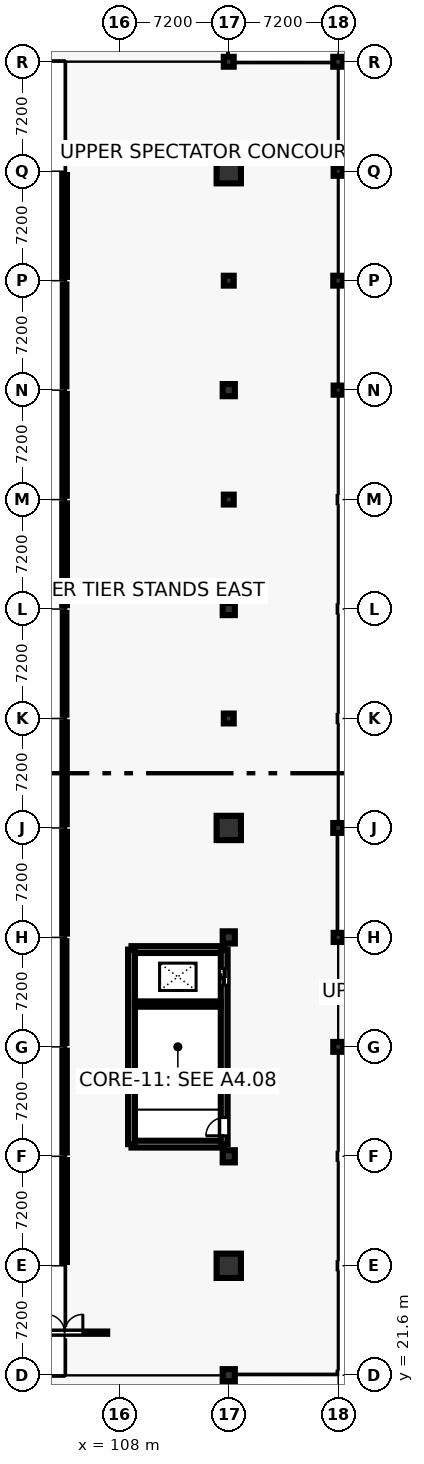
"""IFC4 building model, lengths in metres.
Left out: names, types, materials, properties, quantities, classifications, styles, units other than length and angle.
Written with IfcOpenShell. Run it as: python <this file> out.ifc"""

import sys

from ifc_helpers import new_model, si_unit, direction, frame, frame_2d, origin, origin_2d, place, context, subcontext, project, spatial, rectangle, circle, extrude, element, fill, save


model = new_model("IFC4")
c1 = context("Model", 3, precision=1e-05, world=origin(), true_north=direction((0.0, 1.0)))
c2 = subcontext(c1, "Body", "Model", "MODEL_VIEW")
j1 = project(units=[si_unit("LENGTHUNIT", "METRE"), si_unit("PLANEANGLEUNIT", "RADIAN")], contexts=[c1])
p1 = place(None, origin())
s1 = spatial("IfcSite", under=j1, at=p1, CompositionType="ELEMENT")
p2 = place(p1, origin())
s2 = spatial("IfcBuilding", under=s1, at=p2, CompositionType="ELEMENT")
p3 = place(p2, frame((0.0, 0.0, 13.8)))
s3 = spatial("IfcBuildingStorey", under=s2, at=p3, CompositionType="ELEMENT", Elevation=13.8)
p4 = place(p3, frame((115.2, 21.6, 0.0), z_axis=(0.0, 0.0, 1.0), x_axis=(1.0, 0.0, 0.0)))
e1 = element("IfcColumn", 1, at=p4, inside=s3, PredefinedType="COLUMN", context=c2, shape_type="SweptSolid", body=[
    extrude(circle(Radius=0.4, at=origin_2d()), origin(), (0.0, 0.0, 1.0), 4.8),
])
p5 = place(p3, frame((115.2, 28.8, 0.0), z_axis=(0.0, 0.0, 1.0), x_axis=(1.0, 0.0, 0.0)))
e2 = element("IfcColumn", 2, at=p5, inside=s3, PredefinedType="COLUMN", context=c2, shape_type="SweptSolid", body=[
    extrude(circle(Radius=0.8, at=origin_2d()), origin(), (0.0, 0.0, 1.0), 4.8),
])
for number, where, z_axis, x_axis in (
    (3, (115.2, 36.0, 0.0), (0.0, 0.0, 1.0), (1.0, 0.0, 0.0)),
    (4, (115.2, 50.4, 0.0), (0.0, 0.0, 1.0), (1.0, 0.0, 0.0)),
):
    element("IfcColumn", number, at=place(p3, frame(where, z_axis=z_axis, x_axis=x_axis)), inside=s3, PredefinedType="COLUMN", context=c2, shape_type="SweptSolid", body=[
        extrude(circle(Radius=0.4, at=origin_2d()), origin(), (0.0, 0.0, 1.0), 4.8),
    ])
p6 = place(p3, frame((115.2, 57.6, 0.0), z_axis=(0.0, 0.0, 1.0), x_axis=(1.0, 0.0, 0.0)))
e5 = element("IfcColumn", 5, at=p6, inside=s3, PredefinedType="COLUMN", context=c2, shape_type="SweptSolid", body=[
    extrude(circle(Radius=0.8, at=origin_2d()), origin(), (0.0, 0.0, 1.0), 4.8),
])
p7 = place(p3, frame((115.2, 64.8, 0.0), z_axis=(0.0, 0.0, 1.0), x_axis=(1.0, 0.0, 0.0)))
e6 = element("IfcColumn", 6, at=p7, inside=s3, PredefinedType="COLUMN", context=c2, shape_type="SweptSolid", body=[
    extrude(rectangle(XDim=0.65, YDim=0.65, at=origin_2d()), origin(), (0.0, 0.0, 1.0), 4.8),
])
p8 = place(p3, frame((115.2, 72.0, 0.0), z_axis=(0.0, 0.0, 1.0), x_axis=(1.0, 0.0, 0.0)))
e7 = element("IfcColumn", 7, at=p8, inside=s3, PredefinedType="COLUMN", context=c2, shape_type="SweptSolid", body=[
    extrude(circle(Radius=0.4, at=origin_2d()), origin(), (0.0, 0.0, 1.0), 4.8),
])
p9 = place(p3, frame((115.2, 79.2, 0.0), z_axis=(0.0, 0.0, 1.0), x_axis=(1.0, 0.0, 0.0)))
e8 = element("IfcColumn", 8, at=p9, inside=s3, PredefinedType="COLUMN", context=c2, shape_type="SweptSolid", body=[
    extrude(rectangle(XDim=0.65, YDim=0.65, at=origin_2d()), origin(), (0.0, 0.0, 1.0), 4.8),
])
p10 = place(p3, frame((115.2, 86.4, 0.0), z_axis=(0.0, 0.0, 1.0), x_axis=(1.0, 0.0, 0.0)))
e9 = element("IfcColumn", 9, at=p10, inside=s3, PredefinedType="COLUMN", context=c2, shape_type="SweptSolid", body=[
    extrude(circle(Radius=0.4, at=origin_2d()), origin(), (0.0, 0.0, 1.0), 4.8),
])
p11 = place(p3, frame((115.2, 93.6, 0.0), z_axis=(0.0, 0.0, 1.0), x_axis=(1.0, 0.0, 0.0)))
e10 = element("IfcColumn", 10, at=p11, inside=s3, PredefinedType="COLUMN", context=c2, shape_type="SweptSolid", body=[
    extrude(rectangle(XDim=0.65, YDim=0.65, at=origin_2d()), origin(), (0.0, 0.0, 1.0), 4.8),
])
p12 = place(p3, frame((115.2, 100.8, 0.0), z_axis=(0.0, 0.0, 1.0), x_axis=(1.0, 0.0, 0.0)))
e11 = element("IfcColumn", 11, at=p12, inside=s3, PredefinedType="COLUMN", context=c2, shape_type="SweptSolid", body=[
    extrude(circle(Radius=0.8, at=origin_2d()), origin(), (0.0, 0.0, 1.0), 4.8),
])
for number, where, z_axis, x_axis in (
    (12, (115.2, 108.0, 0.0), (0.0, 0.0, 1.0), (1.0, 0.0, 0.0)),
    (13, (122.4, 43.2, 0.0), (0.0, 0.0, 1.0), (1.0, 0.0, 0.0)),
):
    element("IfcColumn", number, at=place(p3, frame(where, z_axis=z_axis, x_axis=x_axis)), inside=s3, PredefinedType="COLUMN", context=c2, shape_type="SweptSolid", body=[
        extrude(rectangle(XDim=0.65, YDim=0.65, at=origin_2d()), origin(), (0.0, 0.0, 1.0), 4.8),
    ])
p13 = place(p3, frame((122.4, 50.4, 0.0), z_axis=(0.0, 0.0, 1.0), x_axis=(1.0, 0.0, 0.0)))
e14 = element("IfcColumn", 14, at=p13, inside=s3, PredefinedType="COLUMN", context=c2, shape_type="SweptSolid", body=[
    extrude(rectangle(XDim=0.6, YDim=0.6, at=origin_2d()), origin(), (0.0, 0.0, 1.0), 4.8),
])
p14 = place(p3, frame((122.4, 57.6, 0.0), z_axis=(0.0, 0.0, 1.0), x_axis=(1.0, 0.0, 0.0)))
e15 = element("IfcColumn", 15, at=p14, inside=s3, PredefinedType="COLUMN", context=c2, shape_type="SweptSolid", body=[
    extrude(rectangle(XDim=0.65, YDim=0.65, at=origin_2d()), origin(), (0.0, 0.0, 1.0), 4.8),
])
p15 = place(p3, frame((122.4, 86.4, 0.0), z_axis=(0.0, 0.0, 1.0), x_axis=(1.0, 0.0, 0.0)))
e16 = element("IfcColumn", 16, at=p15, inside=s3, PredefinedType="COLUMN", context=c2, shape_type="SweptSolid", body=[
    extrude(rectangle(XDim=0.6, YDim=0.6, at=origin_2d()), origin(), (0.0, 0.0, 1.0), 4.8),
])
p16 = place(p3, frame((122.4, 93.6, 0.0), z_axis=(0.0, 0.0, 1.0), x_axis=(1.0, 0.0, 0.0)))
e17 = element("IfcColumn", 17, at=p16, inside=s3, PredefinedType="COLUMN", context=c2, shape_type="SweptSolid", body=[
    extrude(rectangle(XDim=0.65, YDim=0.65, at=origin_2d()), origin(), (0.0, 0.0, 1.0), 4.8),
])
p17 = place(p3, frame((122.4, 100.8, 0.0), z_axis=(0.0, 0.0, 1.0), x_axis=(1.0, 0.0, 0.0)))
e18 = element("IfcColumn", 18, at=p17, inside=s3, PredefinedType="COLUMN", context=c2, shape_type="SweptSolid", body=[
    extrude(rectangle(XDim=0.6, YDim=0.6, at=origin_2d()), origin(), (0.0, 0.0, 1.0), 4.8),
])
p18 = place(p3, frame((122.4, 108.0, 0.0), z_axis=(0.0, 0.0, 1.0), x_axis=(1.0, 0.0, 0.0)))
e19 = element("IfcColumn", 19, at=p18, inside=s3, PredefinedType="COLUMN", context=c2, shape_type="SweptSolid", body=[
    extrude(rectangle(XDim=0.65, YDim=0.65, at=origin_2d()), origin(), (0.0, 0.0, 1.0), 4.8),
])
for number, where, z_axis, x_axis in (
    (20, (108.8, 36.8, 0.0), (0.0, 0.0, 1.0), (1.0, 0.0, 0.0)),
    (21, (108.8, 49.6, 0.0), (0.0, 0.0, 1.0), (1.0, 0.0, 0.0)),
):
    element("IfcWall", number, at=place(p3, frame(where, z_axis=z_axis, x_axis=x_axis)), inside=s3, PredefinedType="SHEAR", context=c2, shape_type="SweptSolid", body=[
        extrude(rectangle(XDim=6.1, YDim=0.45, at=frame_2d((3.05, 0.0))), origin(), (0.0, 0.0, 1.0), 4.53),
    ])
p19 = place(p3, frame((108.8, 36.8, 0.0), z_axis=(0.0, 0.0, 1.0), x_axis=(0.0, 1.0, 0.0)))
e22 = element("IfcWall", 22, at=p19, inside=s3, PredefinedType="SHEAR", context=c2, shape_type="SweptSolid", body=[
    extrude(rectangle(XDim=12.8, YDim=0.45, at=frame_2d((6.4, 0.0))), origin(), (0.0, 0.0, 1.0), 4.53),
])
p20 = place(p3, frame((114.9, 36.8, 0.0), z_axis=(0.0, 0.0, 1.0), x_axis=(0.0, 1.0, 0.0)))
e23 = element("IfcWall", 23, at=p20, inside=s3, PredefinedType="SHEAR", context=c2, shape_type="SweptSolid", body=[
    extrude(rectangle(XDim=12.8, YDim=0.45, at=frame_2d((6.4, 0.0))), origin(), (0.0, 0.0, 1.0), 4.53),
])
p21 = place(p20, frame((0.55, 0.0, 0.0)))
e24 = element("IfcOpeningElement", 24, at=p21, cuts=e23, PredefinedType="OPENING", context=c2, shape_type="SweptSolid", body=[
    extrude(rectangle(XDim=1.2, YDim=2.25, at=frame_2d((0.6, 1.125))), frame((0.0, 0.235, 0.0), z_axis=(0.0, -1.0, 0.0), x_axis=(1.0, 0.0, 0.0)), (0.0, 0.0, 1.0), 0.47),
])
p22 = place(p20, frame((10.458, 0.0, 0.0)))
e25 = element("IfcOpeningElement", 25, at=p22, cuts=e23, PredefinedType="OPENING", context=c2, shape_type="SweptSolid", body=[
    extrude(rectangle(XDim=1.1, YDim=2.2, at=frame_2d((0.55, 1.1))), frame((0.0, 0.235, 0.0), z_axis=(0.0, -1.0, 0.0), x_axis=(1.0, 0.0, 0.0)), (0.0, 0.0, 1.0), 0.47),
])
p23 = place(p3, frame((109.025, 46.016, 0.0), z_axis=(0.0, 0.0, 1.0), x_axis=(1.0, 0.0, 0.0)))
e26 = element("IfcWall", 26, at=p23, inside=s3, PredefinedType="SHEAR", context=c2, shape_type="SweptSolid", body=[
    extrude(rectangle(XDim=5.65, YDim=0.35, at=frame_2d((2.825, 0.0))), origin(), (0.0, 0.0, 1.0), 4.53),
])
p24 = place(p3, frame((104.4, 29.05, 0.0), z_axis=(0.0, 0.0, 1.0), x_axis=(0.0, 1.0, 0.0)))
e27 = element("IfcWall", 27, at=p24, inside=s3, PredefinedType="SOLIDWALL", context=c2, shape_type="SweptSolid", body=[
    extrude(rectangle(XDim=6.7, YDim=0.31, at=frame_2d((3.35, 0.0))), origin(), (0.0, 0.0, 1.0), 3.59),
])
p25 = place(p24, frame((2.4, 0.0, 0.9)))
e28 = element("IfcOpeningElement", 28, at=p25, cuts=e27, PredefinedType="OPENING", context=c2, shape_type="SweptSolid", body=[
    extrude(rectangle(XDim=1.9, YDim=1.3, at=frame_2d((0.95, 0.65))), frame((0.0, 0.165, 0.0), z_axis=(0.0, -1.0, 0.0), x_axis=(1.0, 0.0, 0.0)), (0.0, 0.0, 1.0), 0.33),
])
p26 = place(p3, frame((104.4, 36.25, 0.0), z_axis=(0.0, 0.0, 1.0), x_axis=(0.0, 1.0, 0.0)))
e29 = element("IfcWall", 29, at=p26, inside=s3, PredefinedType="SOLIDWALL", context=c2, shape_type="SweptSolid", body=[
    extrude(rectangle(XDim=6.7, YDim=0.29, at=frame_2d((3.35, 0.0))), origin(), (0.0, 0.0, 1.0), 3.59),
])
p27 = place(p26, frame((2.7, 0.0, 0.9)))
e30 = element("IfcOpeningElement", 30, at=p27, cuts=e29, PredefinedType="OPENING", context=c2, shape_type="SweptSolid", body=[
    extrude(rectangle(XDim=1.3, YDim=1.3, at=frame_2d((0.65, 0.65))), frame((0.0, 0.155, 0.0), z_axis=(0.0, -1.0, 0.0), x_axis=(1.0, 0.0, 0.0)), (0.0, 0.0, 1.0), 0.31),
])
p28 = place(p3, frame((104.4, 43.45, 0.0), z_axis=(0.0, 0.0, 1.0), x_axis=(0.0, 1.0, 0.0)))
e31 = element("IfcWall", 31, at=p28, inside=s3, PredefinedType="SOLIDWALL", context=c2, shape_type="SweptSolid", body=[
    extrude(rectangle(XDim=6.7, YDim=0.24, at=frame_2d((3.35, 0.0))), origin(), (0.0, 0.0, 1.0), 3.59),
])
p29 = place(p28, frame((2.15, 0.0, 0.9)))
e32 = element("IfcOpeningElement", 32, at=p29, cuts=e31, PredefinedType="OPENING", context=c2, shape_type="SweptSolid", body=[
    extrude(rectangle(XDim=2.4, YDim=1.8, at=frame_2d((1.2, 0.9))), frame((0.0, 0.13, 0.0), z_axis=(0.0, -1.0, 0.0), x_axis=(1.0, 0.0, 0.0)), (0.0, 0.0, 1.0), 0.26),
])
p30 = place(p3, frame((104.4, 50.65, 0.0), z_axis=(0.0, 0.0, 1.0), x_axis=(0.0, 1.0, 0.0)))
e33 = element("IfcWall", 33, at=p30, inside=s3, PredefinedType="SOLIDWALL", context=c2, shape_type="SweptSolid", body=[
    extrude(rectangle(XDim=6.7, YDim=0.31, at=frame_2d((3.35, 0.0))), origin(), (0.0, 0.0, 1.0), 3.59),
])
p31 = place(p30, frame((2.3, 0.0, 0.9)))
e34 = element("IfcOpeningElement", 34, at=p31, cuts=e33, PredefinedType="OPENING", context=c2, shape_type="SweptSolid", body=[
    extrude(rectangle(XDim=2.1, YDim=1.8, at=frame_2d((1.05, 0.9))), frame((0.0, 0.165, 0.0), z_axis=(0.0, -1.0, 0.0), x_axis=(1.0, 0.0, 0.0)), (0.0, 0.0, 1.0), 0.33),
])
p32 = place(p3, frame((104.4, 57.85, 0.0), z_axis=(0.0, 0.0, 1.0), x_axis=(0.0, 1.0, 0.0)))
e35 = element("IfcWall", 35, at=p32, inside=s3, PredefinedType="SOLIDWALL", context=c2, shape_type="SweptSolid", body=[
    extrude(rectangle(XDim=6.7, YDim=0.29, at=frame_2d((3.35, 0.0))), origin(), (0.0, 0.0, 1.0), 3.59),
])
p33 = place(p32, frame((2.45, 0.0, 0.9)))
e36 = element("IfcOpeningElement", 36, at=p33, cuts=e35, PredefinedType="OPENING", context=c2, shape_type="SweptSolid", body=[
    extrude(rectangle(XDim=1.8, YDim=1.8, at=frame_2d((0.9, 0.9))), frame((0.0, 0.155, 0.0), z_axis=(0.0, -1.0, 0.0), x_axis=(1.0, 0.0, 0.0)), (0.0, 0.0, 1.0), 0.31),
])
p34 = place(p3, frame((104.4, 65.05, 0.0), z_axis=(0.0, 0.0, 1.0), x_axis=(0.0, 1.0, 0.0)))
e37 = element("IfcWall", 37, at=p34, inside=s3, PredefinedType="SOLIDWALL", context=c2, shape_type="SweptSolid", body=[
    extrude(rectangle(XDim=6.7, YDim=0.24, at=frame_2d((3.35, 0.0))), origin(), (0.0, 0.0, 1.0), 3.59),
])
p35 = place(p34, frame((2.45, 0.0, 0.9)))
e38 = element("IfcOpeningElement", 38, at=p35, cuts=e37, PredefinedType="OPENING", context=c2, shape_type="SweptSolid", body=[
    extrude(rectangle(XDim=1.8, YDim=1.5, at=frame_2d((0.9, 0.75))), frame((0.0, 0.13, 0.0), z_axis=(0.0, -1.0, 0.0), x_axis=(1.0, 0.0, 0.0)), (0.0, 0.0, 1.0), 0.26),
])
p36 = place(p3, frame((104.4, 72.25, 0.0), z_axis=(0.0, 0.0, 1.0), x_axis=(0.0, 1.0, 0.0)))
e39 = element("IfcWall", 39, at=p36, inside=s3, PredefinedType="SOLIDWALL", context=c2, shape_type="SweptSolid", body=[
    extrude(rectangle(XDim=6.7, YDim=0.31, at=frame_2d((3.35, 0.0))), origin(), (0.0, 0.0, 1.0), 3.59),
])
p37 = place(p36, frame((2.6, 0.0, 0.9)))
e40 = element("IfcOpeningElement", 40, at=p37, cuts=e39, PredefinedType="OPENING", context=c2, shape_type="SweptSolid", body=[
    extrude(rectangle(XDim=1.5, YDim=1.5, at=frame_2d((0.75, 0.75))), frame((0.0, 0.165, 0.0), z_axis=(0.0, -1.0, 0.0), x_axis=(1.0, 0.0, 0.0)), (0.0, 0.0, 1.0), 0.33),
])
p38 = place(p3, frame((104.4, 79.45, 0.0), z_axis=(0.0, 0.0, 1.0), x_axis=(0.0, 1.0, 0.0)))
e41 = element("IfcWall", 41, at=p38, inside=s3, PredefinedType="SOLIDWALL", context=c2, shape_type="SweptSolid", body=[
    extrude(rectangle(XDim=6.7, YDim=0.29, at=frame_2d((3.35, 0.0))), origin(), (0.0, 0.0, 1.0), 3.59),
])
p39 = place(p38, frame((2.75, 0.0, 0.9)))
e42 = element("IfcOpeningElement", 42, at=p39, cuts=e41, PredefinedType="OPENING", context=c2, shape_type="SweptSolid", body=[
    extrude(rectangle(XDim=1.2, YDim=1.5, at=frame_2d((0.6, 0.75))), frame((0.0, 0.155, 0.0), z_axis=(0.0, -1.0, 0.0), x_axis=(1.0, 0.0, 0.0)), (0.0, 0.0, 1.0), 0.31),
])
p40 = place(p3, frame((104.4, 86.65, 0.0), z_axis=(0.0, 0.0, 1.0), x_axis=(0.0, 1.0, 0.0)))
e43 = element("IfcWall", 43, at=p40, inside=s3, PredefinedType="SOLIDWALL", context=c2, shape_type="SweptSolid", body=[
    extrude(rectangle(XDim=6.7, YDim=0.24, at=frame_2d((3.35, 0.0))), origin(), (0.0, 0.0, 1.0), 3.59),
])
p41 = place(p40, frame((1.85, 0.0, 0.9)))
e44 = element("IfcOpeningElement", 44, at=p41, cuts=e43, PredefinedType="OPENING", context=c2, shape_type="SweptSolid", body=[
    extrude(rectangle(XDim=3.0, YDim=1.2, at=frame_2d((1.5, 0.6))), frame((0.0, 0.13, 0.0), z_axis=(0.0, -1.0, 0.0), x_axis=(1.0, 0.0, 0.0)), (0.0, 0.0, 1.0), 0.26),
])
p42 = place(p3, frame((104.4, 93.85, 0.0), z_axis=(0.0, 0.0, 1.0), x_axis=(0.0, 1.0, 0.0)))
e45 = element("IfcWall", 45, at=p42, inside=s3, PredefinedType="SOLIDWALL", context=c2, shape_type="SweptSolid", body=[
    extrude(rectangle(XDim=6.7, YDim=0.31, at=frame_2d((3.35, 0.0))), origin(), (0.0, 0.0, 1.0), 3.59),
])
p43 = place(p42, frame((2.0, 0.0, 0.9)))
e46 = element("IfcOpeningElement", 46, at=p43, cuts=e45, PredefinedType="OPENING", context=c2, shape_type="SweptSolid", body=[
    extrude(rectangle(XDim=2.7, YDim=1.2, at=frame_2d((1.35, 0.6))), frame((0.0, 0.165, 0.0), z_axis=(0.0, -1.0, 0.0), x_axis=(1.0, 0.0, 0.0)), (0.0, 0.0, 1.0), 0.33),
])
p44 = place(p3, frame((101.6, 24.4, 0.0), z_axis=(0.0, 0.0, 1.0), x_axis=(1.0, 0.0, 0.0)))
e47 = element("IfcWall", 47, at=p44, inside=s3, PredefinedType="PARTITIONING", context=c2, shape_type="SweptSolid", body=[
    extrude(rectangle(XDim=5.6, YDim=0.15, at=frame_2d((2.8, 0.0))), origin(), (0.0, 0.0, 1.0), 2.6),
])
p45 = place(p44, frame((1.6, 0.0, 0.0)))
e48 = element("IfcOpeningElement", 48, at=p45, cuts=e47, PredefinedType="OPENING", context=c2, shape_type="SweptSolid", body=[
    extrude(rectangle(XDim=2.4, YDim=2.2, at=frame_2d((1.2, 1.1))), frame((0.0, 0.085, 0.0), z_axis=(0.0, -1.0, 0.0), x_axis=(1.0, 0.0, 0.0)), (0.0, 0.0, 1.0), 0.17),
])
p46 = place(p25, origin())
e49 = element("IfcWindow", 49, at=p46, inside=s3, PartitioningType="SINGLE_PANEL", PredefinedType="WINDOW", context=c2, shape_type="SweptSolid", body=[
    extrude(rectangle(XDim=1.9, YDim=1.3, at=frame_2d((0.95, 0.65))), frame((0.0, 0.03, 0.0), z_axis=(0.0, -1.0, 0.0), x_axis=(1.0, 0.0, 0.0)), (0.0, 0.0, 1.0), 0.06),
])
fill(e28, e49)
p47 = place(p27, origin())
e50 = element("IfcWindow", 50, at=p47, inside=s3, PartitioningType="SINGLE_PANEL", PredefinedType="WINDOW", context=c2, shape_type="SweptSolid", body=[
    extrude(rectangle(XDim=1.3, YDim=1.3, at=frame_2d((0.65, 0.65))), frame((0.0, 0.03, 0.0), z_axis=(0.0, -1.0, 0.0), x_axis=(1.0, 0.0, 0.0)), (0.0, 0.0, 1.0), 0.06),
])
fill(e30, e50)
p48 = place(p29, origin())
e51 = element("IfcWindow", 51, at=p48, inside=s3, PartitioningType="SINGLE_PANEL", PredefinedType="WINDOW", context=c2, shape_type="SweptSolid", body=[
    extrude(rectangle(XDim=2.4, YDim=1.8, at=frame_2d((1.2, 0.9))), frame((0.0, 0.03, 0.0), z_axis=(0.0, -1.0, 0.0), x_axis=(1.0, 0.0, 0.0)), (0.0, 0.0, 1.0), 0.06),
])
fill(e32, e51)
p49 = place(p31, origin())
e52 = element("IfcWindow", 52, at=p49, inside=s3, PartitioningType="SINGLE_PANEL", PredefinedType="WINDOW", context=c2, shape_type="SweptSolid", body=[
    extrude(rectangle(XDim=2.1, YDim=1.8, at=frame_2d((1.05, 0.9))), frame((0.0, 0.03, 0.0), z_axis=(0.0, -1.0, 0.0), x_axis=(1.0, 0.0, 0.0)), (0.0, 0.0, 1.0), 0.06),
])
fill(e34, e52)
p50 = place(p33, origin())
e53 = element("IfcWindow", 53, at=p50, inside=s3, PartitioningType="SINGLE_PANEL", PredefinedType="WINDOW", context=c2, shape_type="SweptSolid", body=[
    extrude(rectangle(XDim=1.8, YDim=1.8, at=frame_2d((0.9, 0.9))), frame((0.0, 0.03, 0.0), z_axis=(0.0, -1.0, 0.0), x_axis=(1.0, 0.0, 0.0)), (0.0, 0.0, 1.0), 0.06),
])
fill(e36, e53)
p51 = place(p35, origin())
e54 = element("IfcWindow", 54, at=p51, inside=s3, PartitioningType="SINGLE_PANEL", PredefinedType="WINDOW", context=c2, shape_type="SweptSolid", body=[
    extrude(rectangle(XDim=1.8, YDim=1.5, at=frame_2d((0.9, 0.75))), frame((0.0, 0.03, 0.0), z_axis=(0.0, -1.0, 0.0), x_axis=(1.0, 0.0, 0.0)), (0.0, 0.0, 1.0), 0.06),
])
fill(e38, e54)
p52 = place(p37, origin())
e55 = element("IfcWindow", 55, at=p52, inside=s3, PartitioningType="SINGLE_PANEL", PredefinedType="WINDOW", context=c2, shape_type="SweptSolid", body=[
    extrude(rectangle(XDim=1.5, YDim=1.5, at=frame_2d((0.75, 0.75))), frame((0.0, 0.03, 0.0), z_axis=(0.0, -1.0, 0.0), x_axis=(1.0, 0.0, 0.0)), (0.0, 0.0, 1.0), 0.06),
])
fill(e40, e55)
p53 = place(p39, origin())
e56 = element("IfcWindow", 56, at=p53, inside=s3, PartitioningType="SINGLE_PANEL", PredefinedType="WINDOW", context=c2, shape_type="SweptSolid", body=[
    extrude(rectangle(XDim=1.2, YDim=1.5, at=frame_2d((0.6, 0.75))), frame((0.0, 0.03, 0.0), z_axis=(0.0, -1.0, 0.0), x_axis=(1.0, 0.0, 0.0)), (0.0, 0.0, 1.0), 0.06),
])
fill(e42, e56)
p54 = place(p41, origin())
e57 = element("IfcWindow", 57, at=p54, inside=s3, PartitioningType="SINGLE_PANEL", PredefinedType="WINDOW", context=c2, shape_type="SweptSolid", body=[
    extrude(rectangle(XDim=3.0, YDim=1.2, at=frame_2d((1.5, 0.6))), frame((0.0, 0.03, 0.0), z_axis=(0.0, -1.0, 0.0), x_axis=(1.0, 0.0, 0.0)), (0.0, 0.0, 1.0), 0.06),
])
fill(e44, e57)
p55 = place(p43, origin())
e58 = element("IfcWindow", 58, at=p55, inside=s3, PartitioningType="SINGLE_PANEL", PredefinedType="WINDOW", context=c2, shape_type="SweptSolid", body=[
    extrude(rectangle(XDim=2.7, YDim=1.2, at=frame_2d((1.35, 0.6))), frame((0.0, 0.03, 0.0), z_axis=(0.0, -1.0, 0.0), x_axis=(1.0, 0.0, 0.0)), (0.0, 0.0, 1.0), 0.06),
])
fill(e46, e58)
p56 = place(p21, origin())
e59 = element("IfcDoor", 59, at=p56, inside=s3, OperationType="SINGLE_SWING_LEFT", PredefinedType="DOOR", context=c2, shape_type="SweptSolid", body=[
    extrude(rectangle(XDim=1.2, YDim=2.25, at=frame_2d((0.6, 1.125))), frame((0.0, 0.025, 0.0), z_axis=(0.0, -1.0, 0.0), x_axis=(1.0, 0.0, 0.0)), (0.0, 0.0, 1.0), 0.05),
])
fill(e24, e59)
p57 = place(p22, origin())
e60 = element("IfcDoor", 60, at=p57, inside=s3, OperationType="SLIDING_TO_RIGHT", PredefinedType="DOOR", context=c2, shape_type="SweptSolid", body=[
    extrude(rectangle(XDim=1.1, YDim=2.2, at=frame_2d((0.55, 1.1))), frame((0.0, 0.025, 0.0), z_axis=(0.0, -1.0, 0.0), x_axis=(1.0, 0.0, 0.0)), (0.0, 0.0, 1.0), 0.05),
])
fill(e25, e60)
p58 = place(p45, origin())
e61 = element("IfcDoor", 61, at=p58, inside=s3, OperationType="DOUBLE_DOOR_SINGLE_SWING", PredefinedType="GATE", context=c2, shape_type="SweptSolid", body=[
    extrude(rectangle(XDim=2.4, YDim=2.2, at=frame_2d((1.2, 1.1))), frame((0.0, 0.025, 0.0), z_axis=(0.0, -1.0, 0.0), x_axis=(1.0, 0.0, 0.0)), (0.0, 0.0, 1.0), 0.05),
])
fill(e48, e61)
save(model, sys.argv[1])
